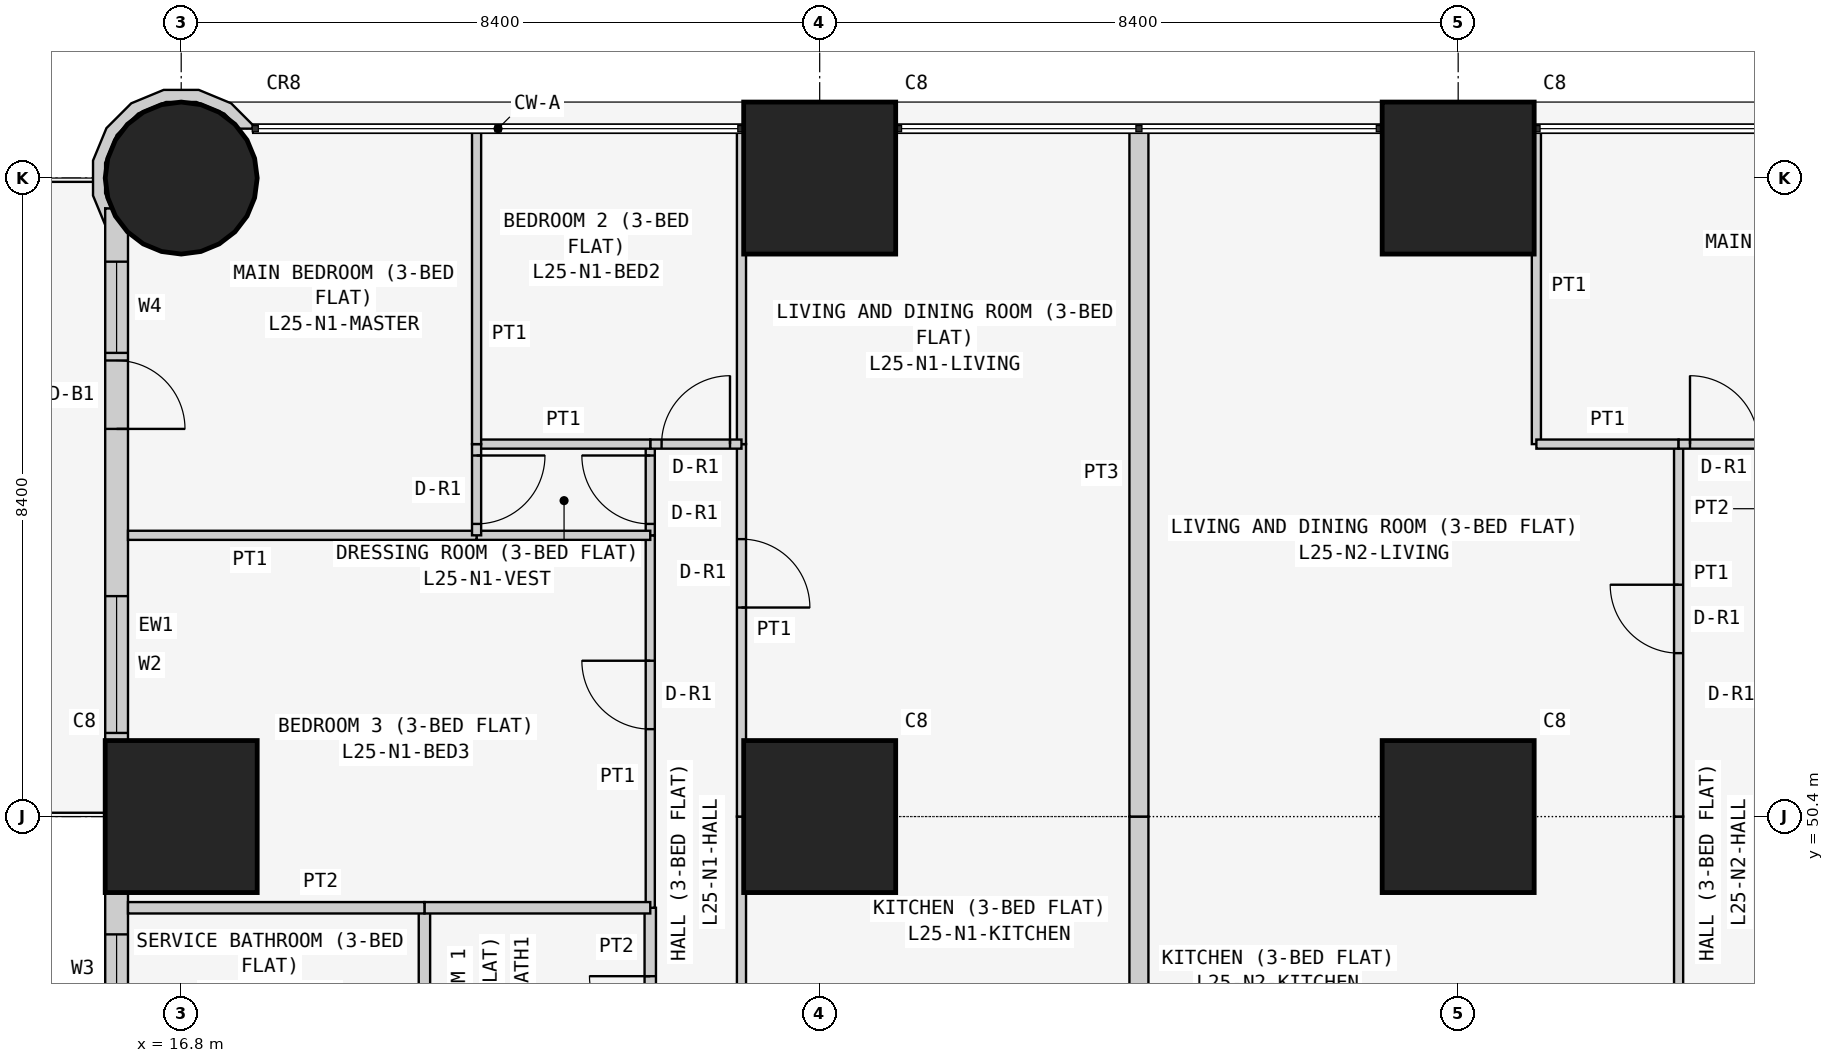
"""IFC4 building model, lengths in metres.
Left out: names, types, materials, properties, quantities, classifications, styles, units other than length and angle.
Written with IfcOpenShell. Run it as: python <this file> out.ifc"""

import sys

from ifc_helpers import new_model, si_unit, direction, frame, frame_2d, origin, origin_2d, place, context, subcontext, project, spatial, polyline, rectangle, circle, outline, extrude, element, fill, save


model = new_model("IFC4")
c1 = context("Model", 3, precision=1e-05, world=origin(), true_north=direction((0.0, 1.0)))
c2 = subcontext(c1, "Body", "Model", "MODEL_VIEW")
j1 = project(units=[si_unit("LENGTHUNIT", "METRE"), si_unit("PLANEANGLEUNIT", "RADIAN")], contexts=[c1])
p1 = place(None, origin())
s1 = spatial("IfcSite", under=j1, at=p1, CompositionType="ELEMENT")
p2 = place(p1, origin())
s2 = spatial("IfcBuilding", under=s1, at=p2, CompositionType="ELEMENT")
p3 = place(p2, frame((0.0, 0.0, 99.3)))
s3 = spatial("IfcBuildingStorey", under=s2, at=p3, CompositionType="ELEMENT", Elevation=99.3)
p4 = place(p3, frame((16.8, 50.4, 0.0), z_axis=(0.0, 0.0, 1.0), x_axis=(1.0, 0.0, 0.0)))
e1 = element("IfcColumn", 1, at=p4, inside=s3, PredefinedType="COLUMN", context=c2, shape_type="SweptSolid", body=[
    extrude(rectangle(XDim=2.0, YDim=2.0, at=origin_2d()), origin(), (0.0, 0.0, 1.0), 3.6),
])
p5 = place(p3, frame((16.8, 58.8, 0.0), z_axis=(0.0, 0.0, 1.0), x_axis=(1.0, 0.0, 0.0)))
e2 = element("IfcColumn", 2, at=p5, inside=s3, PredefinedType="COLUMN", context=c2, shape_type="SweptSolid", body=[
    extrude(circle(Radius=1.0, at=origin_2d()), origin(), (0.0, 0.0, 1.0), 3.6),
])
for number, where, z_axis, x_axis in (
    (3, (25.2, 50.4, 0.0), (0.0, 0.0, 1.0), (1.0, 0.0, 0.0)),
    (4, (25.2, 58.8, 0.0), (0.0, 0.0, 1.0), (1.0, 0.0, 0.0)),
    (5, (33.6, 50.4, 0.0), (0.0, 0.0, 1.0), (1.0, 0.0, 0.0)),
    (6, (33.6, 58.8, 0.0), (0.0, 0.0, 1.0), (1.0, 0.0, 0.0)),
):
    element("IfcColumn", number, at=place(p3, frame(where, z_axis=z_axis, x_axis=x_axis)), inside=s3, PredefinedType="COLUMN", context=c2, shape_type="SweptSolid", body=[
        extrude(rectangle(XDim=2.0, YDim=2.0, at=origin_2d()), origin(), (0.0, 0.0, 1.0), 3.6),
    ])
p6 = place(p3, frame((15.95, 58.4, 0.0), z_axis=(0.0, 0.0, 1.0), x_axis=(0.0, -1.0, 0.0)))
e7 = element("IfcWall", 7, at=p6, inside=s3, PredefinedType="SOLIDWALL", context=c2, shape_type="SweptSolid", body=[
    extrude(rectangle(XDim=15.7, YDim=0.3, at=frame_2d((7.85, 0.0))), origin(), (0.0, 0.0, 1.0), 3.35),
])
p7 = place(p6, frame((12.4, 0.0, 0.9)))
e8 = element("IfcOpeningElement", 8, at=p7, cuts=e7, PredefinedType="OPENING", context=c2, shape_type="SweptSolid", body=[
    extrude(rectangle(XDim=1.8, YDim=1.5, at=frame_2d((0.9, 0.75))), frame((0.0, 0.16, 0.0), z_axis=(0.0, -1.0, 0.0), x_axis=(1.0, 0.0, 0.0)), (0.0, 0.0, 1.0), 0.32),
])
p8 = place(p6, frame((9.55, 0.0, 1.5)))
e9 = element("IfcOpeningElement", 9, at=p8, cuts=e7, PredefinedType="OPENING", context=c2, shape_type="SweptSolid", body=[
    extrude(rectangle(XDim=0.9, YDim=0.7, at=frame_2d((0.45, 0.35))), frame((0.0, 0.16, 0.0), z_axis=(0.0, -1.0, 0.0), x_axis=(1.0, 0.0, 0.0)), (0.0, 0.0, 1.0), 0.32),
])
p9 = place(p6, frame((5.1, 0.0, 0.9)))
e10 = element("IfcOpeningElement", 10, at=p9, cuts=e7, PredefinedType="OPENING", context=c2, shape_type="SweptSolid", body=[
    extrude(rectangle(XDim=1.8, YDim=1.5, at=frame_2d((0.9, 0.75))), frame((0.0, 0.16, 0.0), z_axis=(0.0, -1.0, 0.0), x_axis=(1.0, 0.0, 0.0)), (0.0, 0.0, 1.0), 0.32),
])
p10 = place(p6, frame((2.0, 0.0, 0.0)))
e11 = element("IfcOpeningElement", 11, at=p10, cuts=e7, PredefinedType="OPENING", context=c2, shape_type="SweptSolid", body=[
    extrude(rectangle(XDim=0.9, YDim=2.4, at=frame_2d((0.45, 1.2))), frame((0.0, 0.16, 0.0), z_axis=(0.0, -1.0, 0.0), x_axis=(1.0, 0.0, 0.0)), (0.0, 0.0, 1.0), 0.32),
])
p11 = place(p6, frame((0.7, 0.0, 0.9)))
e12 = element("IfcOpeningElement", 12, at=p11, cuts=e7, PredefinedType="OPENING", context=c2, shape_type="SweptSolid", body=[
    extrude(rectangle(XDim=1.2, YDim=1.5, at=frame_2d((0.6, 0.75))), frame((0.0, 0.16, 0.0), z_axis=(0.0, -1.0, 0.0), x_axis=(1.0, 0.0, 0.0)), (0.0, 0.0, 1.0), 0.32),
])
p12 = place(p3, frame((17.668, 59.443, 0.0), z_axis=(0.0, 0.0, 1.0), x_axis=(-0.555974394895, 0.831199417842, 0.0)))
e13 = element("IfcWall", 13, at=p12, inside=s3, PredefinedType="SOLIDWALL", context=c2, shape_type="SweptSolid", body=[
    extrude(outline(polyline([(0.005, -0.093), (0.4, -0.014), (0.783, 0.242), (1.04, 0.626), (1.13, 1.078), (1.04, 1.531), (0.784, 1.915), (0.401, 2.171), (-0.009, 2.253), (0.171, 2.132), (0.113, 2.066), (0.339, 2.021), (0.67, 1.8), (0.891, 1.469), (0.968, 1.078), (0.89, 0.688), (0.669, 0.357), (0.338, 0.136), (0.062, 0.081), (-0.036, -0.066), (0.005, -0.093)])), origin(), (0.0, 0.0, 1.0), 3.35),
])
p13 = place(p3, frame((24.171, 50.4, 0.0), z_axis=(0.0, 0.0, 1.0), x_axis=(0.0, -1.0, 0.0)))
e14 = element("IfcWall", 14, at=p13, inside=s3, PredefinedType="PARTITIONING", context=c2, shape_type="SweptSolid", body=[
    extrude(rectangle(XDim=2.4, YDim=0.12, at=frame_2d((1.2, 0.0))), origin(), (0.0, 0.0, 1.0), 3.35),
])
p14 = place(p3, frame((29.4, 48.0, 0.0), z_axis=(0.0, 0.0, 1.0), x_axis=(0.0, 1.0, 0.0)))
e15 = element("IfcWall", 15, at=p14, inside=s3, PredefinedType="PARTITIONING", context=c2, shape_type="SweptSolid", body=[
    extrude(rectangle(XDim=2.4, YDim=0.25, at=frame_2d((1.2, 0.0))), origin(), (0.0, 0.0, 1.0), 2.667),
])
p15 = place(p3, frame((24.171, 55.3, 0.0), z_axis=(0.0, 0.0, 1.0), x_axis=(0.0, -1.0, 0.0)))
e16 = element("IfcWall", 16, at=p15, inside=s3, PredefinedType="PARTITIONING", context=c2, shape_type="SweptSolid", body=[
    extrude(rectangle(XDim=4.9, YDim=0.12, at=frame_2d((2.45, 0.0))), origin(), (0.0, 0.0, 1.0), 3.35),
])
p16 = place(p15, frame((1.25, 0.0, 0.0)))
e17 = element("IfcOpeningElement", 17, at=p16, cuts=e16, PredefinedType="OPENING", context=c2, shape_type="SweptSolid", body=[
    extrude(rectangle(XDim=0.9, YDim=2.1, at=frame_2d((0.45, 1.05))), frame((0.0, 0.07, 0.0), z_axis=(0.0, -1.0, 0.0), x_axis=(1.0, 0.0, 0.0)), (0.0, 0.0, 1.0), 0.14),
])
p17 = place(p3, frame((24.171, 59.45, 0.0), z_axis=(0.0, 0.0, 1.0), x_axis=(0.0, -1.0, 0.0)))
e18 = element("IfcWall", 18, at=p17, inside=s3, PredefinedType="PARTITIONING", context=c2, shape_type="SweptSolid", body=[
    extrude(rectangle(XDim=4.15, YDim=0.12, at=frame_2d((2.075, 0.0))), origin(), (0.0, 0.0, 1.0), 3.35),
])
p18 = place(p3, frame((29.4, 50.4, 0.0), z_axis=(0.0, 0.0, 1.0), x_axis=(0.0, 1.0, 0.0)))
e19 = element("IfcWall", 19, at=p18, inside=s3, PredefinedType="PARTITIONING", context=c2, shape_type="SweptSolid", body=[
    extrude(rectangle(XDim=9.05, YDim=0.25, at=frame_2d((4.525, 0.0))), origin(), (0.0, 0.0, 1.0), 2.667),
])
p19 = place(p3, frame((22.971, 49.2, 0.0), z_axis=(0.0, 0.0, 1.0), x_axis=(0.0, -1.0, 0.0)))
e20 = element("IfcWall", 20, at=p19, inside=s3, PredefinedType="PARTITIONING", context=c2, shape_type="SweptSolid", body=[
    extrude(rectangle(XDim=2.6, YDim=0.15, at=frame_2d((1.3, 0.0))), origin(), (0.0, 0.0, 1.0), 3.35),
])
p20 = place(p19, frame((0.9, 0.0, 0.0)))
e21 = element("IfcOpeningElement", 21, at=p20, cuts=e20, PredefinedType="OPENING", context=c2, shape_type="SweptSolid", body=[
    extrude(rectangle(XDim=0.8, YDim=2.1, at=frame_2d((0.4, 1.05))), frame((0.0, 0.085, 0.0), z_axis=(0.0, -1.0, 0.0), x_axis=(1.0, 0.0, 0.0)), (0.0, 0.0, 1.0), 0.17),
])
p21 = place(p3, frame((22.971, 54.1, 0.0), z_axis=(0.0, 0.0, 1.0), x_axis=(0.0, -1.0, 0.0)))
e22 = element("IfcWall", 22, at=p21, inside=s3, PredefinedType="PARTITIONING", context=c2, shape_type="SweptSolid", body=[
    extrude(rectangle(XDim=4.9, YDim=0.12, at=frame_2d((2.45, 0.0))), origin(), (0.0, 0.0, 1.0), 3.35),
])
p22 = place(p21, frame((1.65, 0.0, 0.0)))
e23 = element("IfcOpeningElement", 23, at=p22, cuts=e22, PredefinedType="OPENING", context=c2, shape_type="SweptSolid", body=[
    extrude(rectangle(XDim=0.9, YDim=2.1, at=frame_2d((0.45, 1.05))), frame((0.0, 0.07, 0.0), z_axis=(0.0, -1.0, 0.0), x_axis=(1.0, 0.0, 0.0)), (0.0, 0.0, 1.0), 0.14),
])
p23 = place(p3, frame((22.971, 55.3, 0.0), z_axis=(0.0, 0.0, 1.0), x_axis=(0.0, -1.0, 0.0)))
e24 = element("IfcWall", 24, at=p23, inside=s3, PredefinedType="PARTITIONING", context=c2, shape_type="SweptSolid", body=[
    extrude(rectangle(XDim=1.2, YDim=0.12, at=frame_2d((0.6, 0.0))), origin(), (0.0, 0.0, 1.0), 3.35),
])
p24 = place(p23, frame((0.15, 0.0, 0.0)))
e25 = element("IfcOpeningElement", 25, at=p24, cuts=e24, PredefinedType="OPENING", context=c2, shape_type="SweptSolid", body=[
    extrude(rectangle(XDim=0.9, YDim=2.1, at=frame_2d((0.45, 1.05))), frame((0.0, 0.07, 0.0), z_axis=(0.0, -1.0, 0.0), x_axis=(1.0, 0.0, 0.0)), (0.0, 0.0, 1.0), 0.14),
])
p25 = place(p3, frame((24.171, 55.3, 0.0), z_axis=(0.0, 0.0, 1.0), x_axis=(-1.0, 0.0, 0.0)))
e26 = element("IfcWall", 26, at=p25, inside=s3, PredefinedType="PARTITIONING", context=c2, shape_type="SweptSolid", body=[
    extrude(rectangle(XDim=1.2, YDim=0.12, at=frame_2d((0.6, 0.0))), origin(), (0.0, 0.0, 1.0), 3.35),
])
p26 = place(p25, frame((0.151, 0.0, 0.0)))
e27 = element("IfcOpeningElement", 27, at=p26, cuts=e26, PredefinedType="OPENING", context=c2, shape_type="SweptSolid", body=[
    extrude(rectangle(XDim=0.9, YDim=2.1, at=frame_2d((0.45, 1.05))), frame((0.0, 0.07, 0.0), z_axis=(0.0, -1.0, 0.0), x_axis=(1.0, 0.0, 0.0)), (0.0, 0.0, 1.0), 0.14),
])
p27 = place(p3, frame((20.0, 49.2, 0.0), z_axis=(0.0, 0.0, 1.0), x_axis=(0.0, -1.0, 0.0)))
e28 = element("IfcWall", 28, at=p27, inside=s3, PredefinedType="PARTITIONING", context=c2, shape_type="SweptSolid", body=[
    extrude(rectangle(XDim=2.6, YDim=0.15, at=frame_2d((1.3, 0.0))), origin(), (0.0, 0.0, 1.0), 3.35),
])
p28 = place(p3, frame((22.971, 49.2, 0.0), z_axis=(0.0, 0.0, 1.0), x_axis=(-1.0, 0.0, 0.0)))
e29 = element("IfcWall", 29, at=p28, inside=s3, PredefinedType="PARTITIONING", context=c2, shape_type="SweptSolid", body=[
    extrude(rectangle(XDim=2.971, YDim=0.15, at=frame_2d((1.485, 0.0))), origin(), (0.0, 0.0, 1.0), 3.35),
])
p29 = place(p3, frame((20.0, 49.2, 0.0), z_axis=(0.0, 0.0, 1.0), x_axis=(-1.0, 0.0, 0.0)))
e30 = element("IfcWall", 30, at=p29, inside=s3, PredefinedType="PARTITIONING", context=c2, shape_type="SweptSolid", body=[
    extrude(rectangle(XDim=3.9, YDim=0.15, at=frame_2d((1.95, 0.0))), origin(), (0.0, 0.0, 1.0), 3.35),
])
p30 = place(p3, frame((22.971, 54.1, 0.0), z_axis=(0.0, 0.0, 1.0), x_axis=(-1.0, 0.0, 0.0)))
e31 = element("IfcWall", 31, at=p30, inside=s3, PredefinedType="PARTITIONING", context=c2, shape_type="SweptSolid", body=[
    extrude(rectangle(XDim=2.285, YDim=0.12, at=frame_2d((1.143, 0.0))), origin(), (0.0, 0.0, 1.0), 3.35),
])
p31 = place(p3, frame((20.686, 54.1, 0.0), z_axis=(0.0, 0.0, 1.0), x_axis=(-1.0, 0.0, 0.0)))
e32 = element("IfcWall", 32, at=p31, inside=s3, PredefinedType="PARTITIONING", context=c2, shape_type="SweptSolid", body=[
    extrude(rectangle(XDim=4.586, YDim=0.12, at=frame_2d((2.293, 0.0))), origin(), (0.0, 0.0, 1.0), 3.35),
])
p32 = place(p3, frame((22.971, 55.3, 0.0), z_axis=(0.0, 0.0, 1.0), x_axis=(-1.0, 0.0, 0.0)))
e33 = element("IfcWall", 33, at=p32, inside=s3, PredefinedType="PARTITIONING", context=c2, shape_type="SweptSolid", body=[
    extrude(rectangle(XDim=2.285, YDim=0.12, at=frame_2d((1.143, 0.0))), origin(), (0.0, 0.0, 1.0), 3.35),
])
p33 = place(p3, frame((20.686, 55.3, 0.0), z_axis=(0.0, 0.0, 1.0), x_axis=(0.0, -1.0, 0.0)))
e34 = element("IfcWall", 34, at=p33, inside=s3, PredefinedType="PARTITIONING", context=c2, shape_type="SweptSolid", body=[
    extrude(rectangle(XDim=1.2, YDim=0.12, at=frame_2d((0.6, 0.0))), origin(), (0.0, 0.0, 1.0), 3.35),
])
p34 = place(p33, frame((0.15, 0.0, 0.0)))
e35 = element("IfcOpeningElement", 35, at=p34, cuts=e34, PredefinedType="OPENING", context=c2, shape_type="SweptSolid", body=[
    extrude(rectangle(XDim=0.9, YDim=2.1, at=frame_2d((0.45, 1.05))), frame((0.0, 0.07, 0.0), z_axis=(0.0, -1.0, 0.0), x_axis=(1.0, 0.0, 0.0)), (0.0, 0.0, 1.0), 0.14),
])
p35 = place(p3, frame((20.686, 59.45, 0.0), z_axis=(0.0, 0.0, 1.0), x_axis=(0.0, -1.0, 0.0)))
e36 = element("IfcWall", 36, at=p35, inside=s3, PredefinedType="PARTITIONING", context=c2, shape_type="SweptSolid", body=[
    extrude(rectangle(XDim=4.15, YDim=0.12, at=frame_2d((2.075, 0.0))), origin(), (0.0, 0.0, 1.0), 3.35),
])
p36 = place(p3, frame((36.5, 50.4, 0.0), z_axis=(0.0, 0.0, 1.0), x_axis=(0.0, -1.0, 0.0)))
e37 = element("IfcWall", 37, at=p36, inside=s3, PredefinedType="PARTITIONING", context=c2, shape_type="SweptSolid", body=[
    extrude(rectangle(XDim=3.0, YDim=0.12, at=frame_2d((1.5, 0.0))), origin(), (0.0, 0.0, 1.0), 3.35),
])
p37 = place(p3, frame((36.5, 55.3, 0.0), z_axis=(0.0, 0.0, 1.0), x_axis=(0.0, -1.0, 0.0)))
e38 = element("IfcWall", 38, at=p37, inside=s3, PredefinedType="PARTITIONING", context=c2, shape_type="SweptSolid", body=[
    extrude(rectangle(XDim=4.9, YDim=0.12, at=frame_2d((2.45, 0.0))), origin(), (0.0, 0.0, 1.0), 3.35),
])
p38 = place(p37, frame((1.85, 0.0, 0.0)))
e39 = element("IfcOpeningElement", 39, at=p38, cuts=e38, PredefinedType="OPENING", context=c2, shape_type="SweptSolid", body=[
    extrude(rectangle(XDim=0.9, YDim=2.1, at=frame_2d((0.45, 1.05))), frame((0.0, 0.07, 0.0), z_axis=(0.0, -1.0, 0.0), x_axis=(1.0, 0.0, 0.0)), (0.0, 0.0, 1.0), 0.14),
])
p39 = place(p3, frame((34.629, 59.45, 0.0), z_axis=(0.0, 0.0, 1.0), x_axis=(0.0, -1.0, 0.0)))
e40 = element("IfcWall", 40, at=p39, inside=s3, PredefinedType="PARTITIONING", context=c2, shape_type="SweptSolid", body=[
    extrude(rectangle(XDim=4.15, YDim=0.12, at=frame_2d((2.075, 0.0))), origin(), (0.0, 0.0, 1.0), 3.35),
])
p40 = place(p3, frame((34.629, 55.3, 0.0), z_axis=(0.0, 0.0, 1.0), x_axis=(1.0, 0.0, 0.0)))
e41 = element("IfcWall", 41, at=p40, inside=s3, PredefinedType="PARTITIONING", context=c2, shape_type="SweptSolid", body=[
    extrude(rectangle(XDim=1.871, YDim=0.12, at=frame_2d((0.936, 0.0))), origin(), (0.0, 0.0, 1.0), 3.35),
])
p41 = place(p3, frame((36.5, 55.3, 0.0), z_axis=(0.0, 0.0, 1.0), x_axis=(1.0, 0.0, 0.0)))
e42 = element("IfcWall", 42, at=p41, inside=s3, PredefinedType="PARTITIONING", context=c2, shape_type="SweptSolid", body=[
    extrude(rectangle(XDim=1.2, YDim=0.12, at=frame_2d((0.6, 0.0))), origin(), (0.0, 0.0, 1.0), 3.35),
])
p42 = place(p41, frame((0.15, 0.0, 0.0)))
e43 = element("IfcOpeningElement", 43, at=p42, cuts=e42, PredefinedType="OPENING", context=c2, shape_type="SweptSolid", body=[
    extrude(rectangle(XDim=0.9, YDim=2.1, at=frame_2d((0.45, 1.05))), frame((0.0, 0.07, 0.0), z_axis=(0.0, -1.0, 0.0), x_axis=(1.0, 0.0, 0.0)), (0.0, 0.0, 1.0), 0.14),
])
p43 = place(p8, origin())
e44 = element("IfcWindow", 44, at=p43, inside=s3, PartitioningType="SINGLE_PANEL", PredefinedType="WINDOW", context=c2, shape_type="SweptSolid", body=[
    extrude(rectangle(XDim=0.9, YDim=0.7, at=frame_2d((0.45, 0.35))), frame((0.0, 0.03, 0.0), z_axis=(0.0, -1.0, 0.0), x_axis=(1.0, 0.0, 0.0)), (0.0, 0.0, 1.0), 0.06),
])
fill(e9, e44)
p44 = place(p9, origin())
e45 = element("IfcWindow", 45, at=p44, inside=s3, PartitioningType="SINGLE_PANEL", PredefinedType="WINDOW", context=c2, shape_type="SweptSolid", body=[
    extrude(rectangle(XDim=1.8, YDim=1.5, at=frame_2d((0.9, 0.75))), frame((0.0, 0.03, 0.0), z_axis=(0.0, -1.0, 0.0), x_axis=(1.0, 0.0, 0.0)), (0.0, 0.0, 1.0), 0.06),
])
fill(e10, e45)
p45 = place(p10, origin())
e46 = element("IfcDoor", 46, at=p45, inside=s3, OperationType="SINGLE_SWING_RIGHT", PredefinedType="DOOR", context=c2, shape_type="SweptSolid", body=[
    extrude(rectangle(XDim=0.9, YDim=2.4, at=frame_2d((0.45, 1.2))), frame((0.0, 0.025, 0.0), z_axis=(0.0, -1.0, 0.0), x_axis=(1.0, 0.0, 0.0)), (0.0, 0.0, 1.0), 0.05),
])
fill(e11, e46)
p46 = place(p11, origin())
e47 = element("IfcWindow", 47, at=p46, inside=s3, PartitioningType="SINGLE_PANEL", PredefinedType="WINDOW", context=c2, shape_type="SweptSolid", body=[
    extrude(rectangle(XDim=1.2, YDim=1.5, at=frame_2d((0.6, 0.75))), frame((0.0, 0.03, 0.0), z_axis=(0.0, -1.0, 0.0), x_axis=(1.0, 0.0, 0.0)), (0.0, 0.0, 1.0), 0.06),
])
fill(e12, e47)
p47 = place(p16, origin())
e48 = element("IfcDoor", 48, at=p47, inside=s3, OperationType="SINGLE_SWING_RIGHT", PredefinedType="DOOR", context=c2, shape_type="SweptSolid", body=[
    extrude(rectangle(XDim=0.9, YDim=2.1, at=frame_2d((0.45, 1.05))), frame((0.0, 0.025, 0.0), z_axis=(0.0, -1.0, 0.0), x_axis=(1.0, 0.0, 0.0)), (0.0, 0.0, 1.0), 0.05),
])
fill(e17, e48)
p48 = place(p20, frame((0.8, 0.0, 0.0), z_axis=(0.0, 0.0, 1.0), x_axis=(-1.0, 0.0, 0.0)))
e49 = element("IfcDoor", 49, at=p48, inside=s3, OperationType="SINGLE_SWING_RIGHT", PredefinedType="DOOR", context=c2, shape_type="SweptSolid", body=[
    extrude(rectangle(XDim=0.8, YDim=2.1, at=frame_2d((0.4, 1.05))), frame((0.0, 0.025, 0.0), z_axis=(0.0, -1.0, 0.0), x_axis=(1.0, 0.0, 0.0)), (0.0, 0.0, 1.0), 0.05),
])
fill(e21, e49)
p49 = place(p22, frame((0.9, 0.0, 0.0), z_axis=(0.0, 0.0, 1.0), x_axis=(-1.0, 0.0, 0.0)))
e50 = element("IfcDoor", 50, at=p49, inside=s3, OperationType="SINGLE_SWING_RIGHT", PredefinedType="DOOR", context=c2, shape_type="SweptSolid", body=[
    extrude(rectangle(XDim=0.9, YDim=2.1, at=frame_2d((0.45, 1.05))), frame((0.0, 0.025, 0.0), z_axis=(0.0, -1.0, 0.0), x_axis=(1.0, 0.0, 0.0)), (0.0, 0.0, 1.0), 0.05),
])
fill(e23, e50)
p50 = place(p24, frame((0.9, 0.0, 0.0), z_axis=(0.0, 0.0, 1.0), x_axis=(-1.0, 0.0, 0.0)))
e51 = element("IfcDoor", 51, at=p50, inside=s3, OperationType="SINGLE_SWING_RIGHT", PredefinedType="DOOR", context=c2, shape_type="SweptSolid", body=[
    extrude(rectangle(XDim=0.9, YDim=2.1, at=frame_2d((0.45, 1.05))), frame((0.0, 0.025, 0.0), z_axis=(0.0, -1.0, 0.0), x_axis=(1.0, 0.0, 0.0)), (0.0, 0.0, 1.0), 0.05),
])
fill(e25, e51)
p51 = place(p34, origin())
e52 = element("IfcDoor", 52, at=p51, inside=s3, OperationType="SINGLE_SWING_LEFT", PredefinedType="DOOR", context=c2, shape_type="SweptSolid", body=[
    extrude(rectangle(XDim=0.9, YDim=2.1, at=frame_2d((0.45, 1.05))), frame((0.0, 0.025, 0.0), z_axis=(0.0, -1.0, 0.0), x_axis=(1.0, 0.0, 0.0)), (0.0, 0.0, 1.0), 0.05),
])
fill(e35, e52)
p52 = place(p26, frame((0.9, 0.0, 0.0), z_axis=(0.0, 0.0, 1.0), x_axis=(-1.0, 0.0, 0.0)))
e53 = element("IfcDoor", 53, at=p52, inside=s3, OperationType="SINGLE_SWING_RIGHT", PredefinedType="DOOR", context=c2, shape_type="SweptSolid", body=[
    extrude(rectangle(XDim=0.9, YDim=2.1, at=frame_2d((0.45, 1.05))), frame((0.0, 0.025, 0.0), z_axis=(0.0, -1.0, 0.0), x_axis=(1.0, 0.0, 0.0)), (0.0, 0.0, 1.0), 0.05),
])
fill(e27, e53)
p53 = place(p38, frame((0.9, 0.0, 0.0), z_axis=(0.0, 0.0, 1.0), x_axis=(-1.0, 0.0, 0.0)))
e54 = element("IfcDoor", 54, at=p53, inside=s3, OperationType="SINGLE_SWING_RIGHT", PredefinedType="DOOR", context=c2, shape_type="SweptSolid", body=[
    extrude(rectangle(XDim=0.9, YDim=2.1, at=frame_2d((0.45, 1.05))), frame((0.0, 0.025, 0.0), z_axis=(0.0, -1.0, 0.0), x_axis=(1.0, 0.0, 0.0)), (0.0, 0.0, 1.0), 0.05),
])
fill(e39, e54)
p54 = place(p42, origin())
e55 = element("IfcDoor", 55, at=p54, inside=s3, OperationType="SINGLE_SWING_LEFT", PredefinedType="DOOR", context=c2, shape_type="SweptSolid", body=[
    extrude(rectangle(XDim=0.9, YDim=2.1, at=frame_2d((0.45, 1.05))), frame((0.0, 0.025, 0.0), z_axis=(0.0, -1.0, 0.0), x_axis=(1.0, 0.0, 0.0)), (0.0, 0.0, 1.0), 0.05),
])
fill(e43, e55)
save(model, sys.argv[1])
